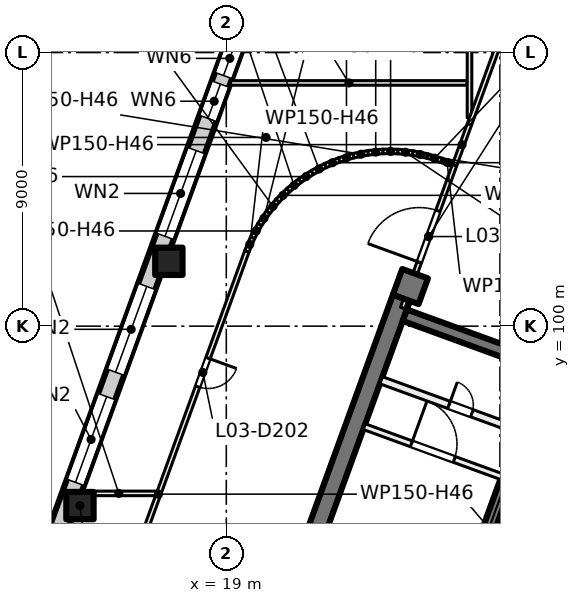
"""IFC4 building model, lengths in metres.
Left out: names, types, materials, properties, quantities, classifications, styles, units other than length and angle.
Written with IfcOpenShell. Run it as: python <this file> out.ifc"""

import sys

from ifc_helpers import new_model, si_unit, direction, frame, frame_2d, origin, origin_2d, place, context, subcontext, project, spatial, rectangle, extrude, element, fill, save


model = new_model("IFC4")
c1 = context("Model", 3, precision=1e-05, world=origin(), true_north=direction((0.0, 1.0)))
c2 = subcontext(c1, "Body", "Model", "MODEL_VIEW")
j1 = project(units=[si_unit("LENGTHUNIT", "METRE"), si_unit("PLANEANGLEUNIT", "RADIAN")], contexts=[c1])
p1 = place(None, origin())
s1 = spatial("IfcSite", under=j1, at=p1, CompositionType="ELEMENT")
p2 = place(p1, origin())
s2 = spatial("IfcBuilding", under=s1, at=p2, CompositionType="ELEMENT")
p3 = place(p2, frame((0.0, 0.0, 17.5)))
s3 = spatial("IfcBuildingStorey", under=s2, at=p3, CompositionType="ELEMENT", Elevation=17.5)
for number, where, z_axis, x_axis in (
    (1, (14.187, 94.099, 0.0), (0.0, 0.0, 1.0), (1.0, 0.0, 0.0)),
    (2, (17.111, 102.133, 0.0), (0.0, 0.0, 1.0), (1.0, 0.0, 0.0)),
    (3, (25.056, 101.303, 0.0), (0.0, 0.0, 1.0), (-0.342, -0.94, 0.0)),
):
    element("IfcColumn", number, at=place(p3, frame(where, z_axis=z_axis, x_axis=x_axis)), inside=s3, PredefinedType="COLUMN", context=c2, shape_type="SweptSolid", body=[
        extrude(rectangle(XDim=0.9, YDim=0.9, at=origin_2d()), origin(), (0.0, 0.0, 1.0), 5.0),
    ])
p4 = place(p3, frame((21.717, 92.568, 0.0), z_axis=(0.0, 0.0, 1.0), x_axis=(0.342016162452, 0.939694069696, 0.0)))
e4 = element("IfcWall", 4, at=p4, inside=s3, PredefinedType="SHEAR", context=c2, shape_type="SweptSolid", body=[
    extrude(rectangle(XDim=8.9, YDim=0.6, at=frame_2d((4.45, 0.0))), origin(), (0.0, 0.0, 1.0), 5.0),
])
p5 = place(p3, frame((27.225, 82.263, 0.0), z_axis=(0.0, 0.0, 1.0), x_axis=(0.342014590177, 0.939694641948, 0.0)))
e5 = element("IfcWall", 5, at=p5, inside=s3, PredefinedType="SHEAR", context=c2, shape_type="SweptSolid", body=[
    extrude(rectangle(XDim=12.2, YDim=0.4, at=frame_2d((6.1, 0.0))), origin(), (0.0, 0.0, 1.0), 5.0),
])
p6 = place(p5, frame((10.25, 0.0, 0.0)))
e6 = element("IfcOpeningElement", 6, at=p6, cuts=e5, PredefinedType="OPENING", context=c2, shape_type="SweptSolid", body=[
    extrude(rectangle(XDim=1.1, YDim=2.1, at=frame_2d((0.55, 1.05))), frame((0.0, 0.21, 0.0), z_axis=(0.0, -1.0, 0.0), x_axis=(1.0, 0.0, 0.0)), (0.0, 0.0, 1.0), 0.42),
])
p7 = place(p5, frame((0.7, 0.0, 0.0)))
e7 = element("IfcOpeningElement", 7, at=p7, cuts=e5, PredefinedType="OPENING", context=c2, shape_type="SweptSolid", body=[
    extrude(rectangle(XDim=0.8, YDim=2.1, at=frame_2d((0.4, 1.05))), frame((0.0, 0.21, 0.0), z_axis=(0.0, -1.0, 0.0), x_axis=(1.0, 0.0, 0.0)), (0.0, 0.0, 1.0), 0.42),
])
p8 = place(p3, frame((24.03, 83.426, 0.0), z_axis=(0.0, 0.0, 1.0), x_axis=(0.342014590177, 0.939694641948, 0.0)))
e8 = element("IfcWall", 8, at=p8, inside=s3, PredefinedType="SHEAR", context=c2, shape_type="SweptSolid", body=[
    extrude(rectangle(XDim=12.2, YDim=0.4, at=frame_2d((6.1, 0.0))), origin(), (0.0, 0.0, 1.0), 5.0),
])
p9 = place(p8, frame((7.9, 0.0, 0.0)))
e9 = element("IfcOpeningElement", 9, at=p9, cuts=e8, PredefinedType="OPENING", context=c2, shape_type="SweptSolid", body=[
    extrude(rectangle(XDim=1.1, YDim=2.1, at=frame_2d((0.55, 1.05))), frame((0.0, 0.21, 0.0), z_axis=(0.0, -1.0, 0.0), x_axis=(1.0, 0.0, 0.0)), (0.0, 0.0, 1.0), 0.42),
])
p10 = place(p3, frame((32.953, 97.418, 0.0), z_axis=(0.0, 0.0, 1.0), x_axis=(-0.93969060187, 0.342025690201, 0.0)))
e10 = element("IfcWall", 10, at=p10, inside=s3, PredefinedType="SHEAR", context=c2, shape_type="SweptSolid", body=[
    extrude(rectangle(XDim=8.6, YDim=0.4, at=frame_2d((4.3, 0.0))), origin(), (0.0, 0.0, 1.0), 5.0),
])
p11 = place(p3, frame((12.199, 89.809, 0.0), z_axis=(0.0, 0.0, 1.0), x_axis=(0.342022998908, 0.939691581434, 0.0)))
e11 = element("IfcWall", 11, at=p11, inside=s3, PredefinedType="SOLIDWALL", context=c2, shape_type="SweptSolid", body=[
    extrude(rectangle(XDim=47.334, YDim=0.6, at=frame_2d((23.667, 0.0))), origin(), (0.0, 0.0, 1.0), 4.6),
])
p12 = place(p11, frame((0.773, 0.0, 0.9)))
e12 = element("IfcOpeningElement", 12, at=p12, cuts=e11, PredefinedType="OPENING", context=c2, shape_type="SweptSolid", body=[
    extrude(rectangle(XDim=3.0, YDim=3.0, at=frame_2d((1.5, 1.5))), frame((0.0, 0.31, 0.0), z_axis=(0.0, -1.0, 0.0), x_axis=(1.0, 0.0, 0.0)), (0.0, 0.0, 1.0), 0.62),
])
p13 = place(p11, frame((5.379, 0.0, 0.9)))
e13 = element("IfcOpeningElement", 13, at=p13, cuts=e11, PredefinedType="OPENING", context=c2, shape_type="SweptSolid", body=[
    extrude(rectangle(XDim=3.0, YDim=3.0, at=frame_2d((1.5, 1.5))), frame((0.0, 0.31, 0.0), z_axis=(0.0, -1.0, 0.0), x_axis=(1.0, 0.0, 0.0)), (0.0, 0.0, 1.0), 0.62),
])
p14 = place(p11, frame((9.235, 0.0, 0.9)))
e14 = element("IfcOpeningElement", 14, at=p14, cuts=e11, PredefinedType="OPENING", context=c2, shape_type="SweptSolid", body=[
    extrude(rectangle(XDim=3.0, YDim=3.0, at=frame_2d((1.5, 1.5))), frame((0.0, 0.31, 0.0), z_axis=(0.0, -1.0, 0.0), x_axis=(1.0, 0.0, 0.0)), (0.0, 0.0, 1.0), 0.62),
])
p15 = place(p11, frame((13.99, 0.0, 0.9)))
e15 = element("IfcOpeningElement", 15, at=p15, cuts=e11, PredefinedType="OPENING", context=c2, shape_type="SweptSolid", body=[
    extrude(rectangle(XDim=3.0, YDim=3.0, at=frame_2d((1.5, 1.5))), frame((0.0, 0.31, 0.0), z_axis=(0.0, -1.0, 0.0), x_axis=(1.0, 0.0, 0.0)), (0.0, 0.0, 1.0), 0.62),
])
p16 = place(p11, frame((18.118, 0.0, 0.9)))
e16 = element("IfcOpeningElement", 16, at=p16, cuts=e11, PredefinedType="OPENING", context=c2, shape_type="SweptSolid", body=[
    extrude(rectangle(XDim=1.2, YDim=3.0, at=frame_2d((0.6, 1.5))), frame((0.0, 0.31, 0.0), z_axis=(0.0, -1.0, 0.0), x_axis=(1.0, 0.0, 0.0)), (0.0, 0.0, 1.0), 0.62),
])
p17 = place(p11, frame((19.618, 0.0, 0.9)))
e17 = element("IfcOpeningElement", 17, at=p17, cuts=e11, PredefinedType="OPENING", context=c2, shape_type="SweptSolid", body=[
    extrude(rectangle(XDim=1.2, YDim=3.0, at=frame_2d((0.6, 1.5))), frame((0.0, 0.31, 0.0), z_axis=(0.0, -1.0, 0.0), x_axis=(1.0, 0.0, 0.0)), (0.0, 0.0, 1.0), 0.62),
])
p18 = place(p11, frame((22.452, 0.0, 0.9)))
e18 = element("IfcOpeningElement", 18, at=p18, cuts=e11, PredefinedType="OPENING", context=c2, shape_type="SweptSolid", body=[
    extrude(rectangle(XDim=3.0, YDim=3.0, at=frame_2d((1.5, 1.5))), frame((0.0, 0.31, 0.0), z_axis=(0.0, -1.0, 0.0), x_axis=(1.0, 0.0, 0.0)), (0.0, 0.0, 1.0), 0.62),
])
p19 = place(p11, frame((26.458, 0.0, 0.9)))
e19 = element("IfcOpeningElement", 19, at=p19, cuts=e11, PredefinedType="OPENING", context=c2, shape_type="SweptSolid", body=[
    extrude(rectangle(XDim=3.0, YDim=3.0, at=frame_2d((1.5, 1.5))), frame((0.0, 0.31, 0.0), z_axis=(0.0, -1.0, 0.0), x_axis=(1.0, 0.0, 0.0)), (0.0, 0.0, 1.0), 0.62),
])
p20 = place(p11, frame((32.484, 0.0, 0.9)))
e20 = element("IfcOpeningElement", 20, at=p20, cuts=e11, PredefinedType="OPENING", context=c2, shape_type="SweptSolid", body=[
    extrude(rectangle(XDim=1.2, YDim=3.0, at=frame_2d((0.6, 1.5))), frame((0.0, 0.31, 0.0), z_axis=(0.0, -1.0, 0.0), x_axis=(1.0, 0.0, 0.0)), (0.0, 0.0, 1.0), 0.62),
])
p21 = place(p11, frame((35.07, 0.0, 0.9)))
e21 = element("IfcOpeningElement", 21, at=p21, cuts=e11, PredefinedType="OPENING", context=c2, shape_type="SweptSolid", body=[
    extrude(rectangle(XDim=3.0, YDim=3.0, at=frame_2d((1.5, 1.5))), frame((0.0, 0.31, 0.0), z_axis=(0.0, -1.0, 0.0), x_axis=(1.0, 0.0, 0.0)), (0.0, 0.0, 1.0), 0.62),
])
p22 = place(p11, frame((39.676, 0.0, 0.9)))
e22 = element("IfcOpeningElement", 22, at=p22, cuts=e11, PredefinedType="OPENING", context=c2, shape_type="SweptSolid", body=[
    extrude(rectangle(XDim=3.0, YDim=3.0, at=frame_2d((1.5, 1.5))), frame((0.0, 0.31, 0.0), z_axis=(0.0, -1.0, 0.0), x_axis=(1.0, 0.0, 0.0)), (0.0, 0.0, 1.0), 0.62),
])
p23 = place(p11, frame((43.531, 0.0, 0.9)))
e23 = element("IfcOpeningElement", 23, at=p23, cuts=e11, PredefinedType="OPENING", context=c2, shape_type="SweptSolid", body=[
    extrude(rectangle(XDim=3.0, YDim=3.0, at=frame_2d((1.5, 1.5))), frame((0.0, 0.31, 0.0), z_axis=(0.0, -1.0, 0.0), x_axis=(1.0, 0.0, 0.0)), (0.0, 0.0, 1.0), 0.62),
])
p24 = place(p3, frame((23.538, 96.694, 0.0), z_axis=(0.0, 0.0, 1.0), x_axis=(0.939691552312, -0.342023078919, 0.0)))
e24 = element("IfcWall", 24, at=p24, inside=s3, PredefinedType="PARTITIONING", context=c2, shape_type="SweptSolid", body=[
    extrude(rectangle(XDim=8.4, YDim=0.2, at=frame_2d((4.2, 0.0))), origin(), (0.0, 0.0, 1.0), 4.6),
])
p25 = place(p24, frame((1.65, 0.0, 0.0)))
e25 = element("IfcOpeningElement", 25, at=p25, cuts=e24, PredefinedType="OPENING", context=c2, shape_type="SweptSolid", body=[
    extrude(rectangle(XDim=1.5, YDim=2.1, at=frame_2d((0.75, 1.05))), frame((0.0, 0.11, 0.0), z_axis=(0.0, -1.0, 0.0), x_axis=(1.0, 0.0, 0.0)), (0.0, 0.0, 1.0), 0.22),
])
p26 = place(p3, frame((24.094, 98.221, 0.0), z_axis=(0.0, 0.0, 1.0), x_axis=(0.939691552312, -0.342023078919, 0.0)))
e26 = element("IfcWall", 26, at=p26, inside=s3, PredefinedType="PARTITIONING", context=c2, shape_type="SweptSolid", body=[
    extrude(rectangle(XDim=8.4, YDim=0.25, at=frame_2d((4.2, 0.0))), origin(), (0.0, 0.0, 1.0), 4.6),
])
p27 = place(p26, frame((6.625, 0.0, 0.0)))
e27 = element("IfcOpeningElement", 27, at=p27, cuts=e26, PredefinedType="OPENING", context=c2, shape_type="SweptSolid", body=[
    extrude(rectangle(XDim=0.8, YDim=2.1, at=frame_2d((0.4, 1.05))), frame((0.0, 0.135, 0.0), z_axis=(0.0, -1.0, 0.0), x_axis=(1.0, 0.0, 0.0)), (0.0, 0.0, 1.0), 0.27),
])
p28 = place(p26, frame((2.375, 0.0, 0.0)))
e28 = element("IfcOpeningElement", 28, at=p28, cuts=e26, PredefinedType="OPENING", context=c2, shape_type="SweptSolid", body=[
    extrude(rectangle(XDim=0.8, YDim=2.1, at=frame_2d((0.4, 1.05))), frame((0.0, 0.135, 0.0), z_axis=(0.0, -1.0, 0.0), x_axis=(1.0, 0.0, 0.0)), (0.0, 0.0, 1.0), 0.27),
])
p29 = place(p3, frame((13.863, 86.486, 0.0), z_axis=(0.0, 0.0, 1.0), x_axis=(0.342040480313, 0.939685218478, 0.0)))
e29 = element("IfcWall", 29, at=p29, inside=s3, PredefinedType="PARTITIONING", context=c2, shape_type="SweptSolid", body=[
    extrude(rectangle(XDim=17.004, YDim=0.15, at=frame_2d((8.502, 0.0))), origin(), (0.0, 0.0, 1.0), 4.6),
])
p30 = place(p29, frame((3.767, 0.0, 0.0)))
e30 = element("IfcOpeningElement", 30, at=p30, cuts=e29, PredefinedType="OPENING", context=c2, shape_type="SweptSolid", body=[
    extrude(rectangle(XDim=1.0, YDim=2.1, at=frame_2d((0.5, 1.05))), frame((0.0, 0.085, 0.0), z_axis=(0.0, -1.0, 0.0), x_axis=(1.0, 0.0, 0.0)), (0.0, 0.0, 1.0), 0.17),
])
p31 = place(p29, frame((12.263, 0.0, 0.0)))
e31 = element("IfcOpeningElement", 31, at=p31, cuts=e29, PredefinedType="OPENING", context=c2, shape_type="SweptSolid", body=[
    extrude(rectangle(XDim=1.0, YDim=2.1, at=frame_2d((0.5, 1.05))), frame((0.0, 0.085, 0.0), z_axis=(0.0, -1.0, 0.0), x_axis=(1.0, 0.0, 0.0)), (0.0, 0.0, 1.0), 0.17),
])
p32 = place(p3, frame((14.226, 94.5, 0.0), z_axis=(0.0, 0.0, 1.0), x_axis=(1.0, 0.0, 0.0)))
e32 = element("IfcWall", 32, at=p32, inside=s3, PredefinedType="PARTITIONING", context=c2, shape_type="SweptSolid", body=[
    extrude(rectangle(XDim=2.474, YDim=0.15, at=frame_2d((1.237, 0.0))), origin(), (0.0, 0.0, 1.0), 4.6),
])
p33 = place(p3, frame((19.14, 108.0, 0.0), z_axis=(0.0, 0.0, 1.0), x_axis=(1.0, 0.0, 0.0)))
e33 = element("IfcWall", 33, at=p33, inside=s3, PredefinedType="PARTITIONING", context=c2, shape_type="SweptSolid", body=[
    extrude(rectangle(XDim=7.785, YDim=0.15, at=frame_2d((3.893, 0.0))), origin(), (0.0, 0.0, 1.0), 4.6),
])
p34 = place(p3, frame((19.677, 102.46, 0.0), z_axis=(0.0, 0.0, 1.0), x_axis=(0.386429931229, 0.922318767157, 0.0)))
e34 = element("IfcWall", 34, at=p34, inside=s3, PredefinedType="PARTITIONING", context=c2, shape_type="SweptSolid", body=[
    extrude(rectangle(XDim=0.497, YDim=0.15, at=frame_2d((0.248, 0.0))), origin(), (0.0, 0.0, 1.0), 4.6),
])
p35 = place(p3, frame((19.866, 102.912, 0.0), z_axis=(0.0, 0.0, 1.0), x_axis=(0.478336447807, 0.878176658025, 0.0)))
e35 = element("IfcWall", 35, at=p35, inside=s3, PredefinedType="PARTITIONING", context=c2, shape_type="SweptSolid", body=[
    extrude(rectangle(XDim=0.498, YDim=0.15, at=frame_2d((0.249, 0.0))), origin(), (0.0, 0.0, 1.0), 4.6),
])
p36 = place(p3, frame((20.1, 103.343, 0.0), z_axis=(0.0, 0.0, 1.0), x_axis=(0.559439200494, 0.828871389874, 0.0)))
e36 = element("IfcWall", 36, at=p36, inside=s3, PredefinedType="PARTITIONING", context=c2, shape_type="SweptSolid", body=[
    extrude(rectangle(XDim=0.498, YDim=0.15, at=frame_2d((0.249, 0.0))), origin(), (0.0, 0.0, 1.0), 4.6),
])
p37 = place(p3, frame((20.375, 103.75, 0.0), z_axis=(0.0, 0.0, 1.0), x_axis=(0.637426997618, 0.77051075444, 0.0)))
e37 = element("IfcWall", 37, at=p37, inside=s3, PredefinedType="PARTITIONING", context=c2, shape_type="SweptSolid", body=[
    extrude(rectangle(XDim=0.497, YDim=0.15, at=frame_2d((0.249, 0.0))), origin(), (0.0, 0.0, 1.0), 4.6),
])
p38 = place(p3, frame((20.687, 104.127, 0.0), z_axis=(0.0, 0.0, 1.0), x_axis=(0.711007970504, 0.703183948821, 0.0)))
e38 = element("IfcWall", 38, at=p38, inside=s3, PredefinedType="PARTITIONING", context=c2, shape_type="SweptSolid", body=[
    extrude(rectangle(XDim=0.499, YDim=0.15, at=frame_2d((0.25, 0.0))), origin(), (0.0, 0.0, 1.0), 4.6),
])
p39 = place(p3, frame((21.036, 104.473, 0.0), z_axis=(0.0, 0.0, 1.0), x_axis=(0.77650322697, 0.630113274345, 0.0)))
e39 = element("IfcWall", 39, at=p39, inside=s3, PredefinedType="PARTITIONING", context=c2, shape_type="SweptSolid", body=[
    extrude(rectangle(XDim=0.499, YDim=0.15, at=frame_2d((0.249, 0.0))), origin(), (0.0, 0.0, 1.0), 4.6),
])
for number, where, z_axis, x_axis in (
    (40, (21.417, 104.783, 0.0), (0.0, 0.0, 1.0), (0.835, 0.55, 0.0)),
    (41, (21.827, 105.053, 0.0), (0.0, 0.0, 1.0), (0.884, 0.468, 0.0)),
):
    element("IfcWall", number, at=place(p3, frame(where, z_axis=z_axis, x_axis=x_axis)), inside=s3, PredefinedType="PARTITIONING", context=c2, shape_type="SweptSolid", body=[
        extrude(rectangle(XDim=0.498, YDim=0.15, at=frame_2d((0.249, 0.0))), origin(), (0.0, 0.0, 1.0), 4.6),
    ])
p40 = place(p3, frame((22.261, 105.283, 0.0), z_axis=(0.0, 0.0, 1.0), x_axis=(0.926359379867, 0.376640809436, 0.0)))
e42 = element("IfcWall", 42, at=p40, inside=s3, PredefinedType="PARTITIONING", context=c2, shape_type="SweptSolid", body=[
    extrude(rectangle(XDim=0.497, YDim=0.15, at=frame_2d((0.248, 0.0))), origin(), (0.0, 0.0, 1.0), 4.6),
])
p41 = place(p3, frame((22.714, 105.468, 0.0), z_axis=(0.0, 0.0, 1.0), x_axis=(0.958511041414, 0.285055404243, 0.0)))
e43 = element("IfcWall", 43, at=p41, inside=s3, PredefinedType="PARTITIONING", context=c2, shape_type="SweptSolid", body=[
    extrude(rectangle(XDim=0.499, YDim=0.15, at=frame_2d((0.249, 0.0))), origin(), (0.0, 0.0, 1.0), 4.6),
])
p42 = place(p3, frame((23.184, 105.608, 0.0), z_axis=(0.0, 0.0, 1.0), x_axis=(0.981729772821, 0.190280459207, 0.0)))
e44 = element("IfcWall", 44, at=p42, inside=s3, PredefinedType="PARTITIONING", context=c2, shape_type="SweptSolid", body=[
    extrude(rectangle(XDim=0.499, YDim=0.15, at=frame_2d((0.25, 0.0))), origin(), (0.0, 0.0, 1.0), 4.6),
])
p43 = place(p3, frame((23.666, 105.702, 0.0), z_axis=(0.0, 0.0, 1.0), x_axis=(0.995719029091, 0.092431678044, 0.0)))
e45 = element("IfcWall", 45, at=p43, inside=s3, PredefinedType="PARTITIONING", context=c2, shape_type="SweptSolid", body=[
    extrude(rectangle(XDim=0.499, YDim=0.15, at=frame_2d((0.25, 0.0))), origin(), (0.0, 0.0, 1.0), 4.6),
])
p44 = place(p3, frame((24.155, 105.748, 0.0), z_axis=(0.0, 0.0, 1.0), x_axis=(0.999982699411, -0.005882251173, 0.0)))
e46 = element("IfcWall", 46, at=p44, inside=s3, PredefinedType="PARTITIONING", context=c2, shape_type="SweptSolid", body=[
    extrude(rectangle(XDim=0.498, YDim=0.15, at=frame_2d((0.249, 0.0))), origin(), (0.0, 0.0, 1.0), 4.6),
])
p45 = place(p3, frame((24.645, 105.745, 0.0), z_axis=(0.0, 0.0, 1.0), x_axis=(0.994752095055, -0.102314560958, 0.0)))
e47 = element("IfcWall", 47, at=p45, inside=s3, PredefinedType="PARTITIONING", context=c2, shape_type="SweptSolid", body=[
    extrude(rectangle(XDim=0.499, YDim=0.15, at=frame_2d((0.25, 0.0))), origin(), (0.0, 0.0, 1.0), 4.6),
])
p46 = place(p3, frame((24.8, 100.598, 0.0), z_axis=(0.0, 0.0, 1.0), x_axis=(0.34194689438, 0.939719277989, 0.0)))
e48 = element("IfcWall", 48, at=p46, inside=s3, PredefinedType="PARTITIONING", context=c2, shape_type="SweptSolid", body=[
    extrude(rectangle(XDim=5.001, YDim=0.15, at=frame_2d((2.5, 0.0))), origin(), (0.0, 0.0, 1.0), 4.6),
])
p47 = place(p46, frame((1.6, 0.0, 0.0)))
e49 = element("IfcOpeningElement", 49, at=p47, cuts=e48, PredefinedType="OPENING", context=c2, shape_type="SweptSolid", body=[
    extrude(rectangle(XDim=1.8, YDim=2.1, at=frame_2d((0.9, 1.05))), frame((0.0, 0.085, 0.0), z_axis=(0.0, -1.0, 0.0), x_axis=(1.0, 0.0, 0.0)), (0.0, 0.0, 1.0), 0.17),
])
p48 = place(p3, frame((25.133, 105.695, 0.0), z_axis=(0.0, 0.0, 1.0), x_axis=(0.979686550711, -0.200534940485, 0.0)))
e50 = element("IfcWall", 50, at=p48, inside=s3, PredefinedType="PARTITIONING", context=c2, shape_type="SweptSolid", body=[
    extrude(rectangle(XDim=0.499, YDim=0.15, at=frame_2d((0.25, 0.0))), origin(), (0.0, 0.0, 1.0), 4.6),
])
p49 = place(p3, frame((25.614, 105.597, 0.0), z_axis=(0.0, 0.0, 1.0), x_axis=(0.955332101268, -0.29553439104, 0.0)))
e51 = element("IfcWall", 51, at=p49, inside=s3, PredefinedType="PARTITIONING", context=c2, shape_type="SweptSolid", body=[
    extrude(rectangle(XDim=0.497, YDim=0.15, at=frame_2d((0.249, 0.0))), origin(), (0.0, 0.0, 1.0), 4.6),
])
p50 = place(p3, frame((26.085, 105.452, 0.0), z_axis=(0.0, 0.0, 1.0), x_axis=(0.939944328342, -0.341327789109, 0.0)))
e52 = element("IfcWall", 52, at=p50, inside=s3, PredefinedType="PARTITIONING", context=c2, shape_type="SweptSolid", body=[
    extrude(rectangle(XDim=0.378, YDim=0.15, at=frame_2d((0.189, 0.0))), origin(), (0.0, 0.0, 1.0), 4.6),
])
p51 = place(p3, frame((26.51, 105.297, 0.0), z_axis=(0.0, 0.0, 1.0), x_axis=(0.341866150321, 0.939748655367, 0.0)))
e53 = element("IfcWall", 53, at=p51, inside=s3, PredefinedType="PARTITIONING", context=c2, shape_type="SweptSolid", body=[
    extrude(rectangle(XDim=1.433, YDim=0.15, at=frame_2d((0.717, 0.0))), origin(), (0.0, 0.0, 1.0), 4.6),
])
p52 = place(p3, frame((27.0, 106.858, 0.0), z_axis=(0.0, 0.0, 1.0), x_axis=(0.0, 1.0, 0.0)))
e54 = element("IfcWall", 54, at=p52, inside=s3, PredefinedType="PARTITIONING", context=c2, shape_type="SweptSolid", body=[
    extrude(rectangle(XDim=12.103, YDim=0.15, at=frame_2d((6.052, 0.0))), origin(), (0.0, 0.0, 1.0), 4.6),
])
p53 = place(p3, frame((27.0, 106.644, 0.0), z_axis=(0.0, 0.0, 1.0), x_axis=(0.3420012765, 0.939699487534, 0.0)))
e55 = element("IfcWall", 55, at=p53, inside=s3, PredefinedType="PARTITIONING", context=c2, shape_type="SweptSolid", body=[
    extrude(rectangle(XDim=13.816, YDim=0.15, at=frame_2d((6.908, 0.0))), origin(), (0.0, 0.0, 1.0), 4.6),
])
p54 = place(p13, origin())
e56 = element("IfcWindow", 56, at=p54, inside=s3, PartitioningType="SINGLE_PANEL", PredefinedType="WINDOW", context=c2, shape_type="SweptSolid", body=[
    extrude(rectangle(XDim=3.0, YDim=3.0, at=frame_2d((1.5, 1.5))), frame((0.0, 0.03, 0.0), z_axis=(0.0, -1.0, 0.0), x_axis=(1.0, 0.0, 0.0)), (0.0, 0.0, 1.0), 0.06),
])
fill(e13, e56)
p55 = place(p14, origin())
e57 = element("IfcWindow", 57, at=p55, inside=s3, PartitioningType="SINGLE_PANEL", PredefinedType="WINDOW", context=c2, shape_type="SweptSolid", body=[
    extrude(rectangle(XDim=3.0, YDim=3.0, at=frame_2d((1.5, 1.5))), frame((0.0, 0.03, 0.0), z_axis=(0.0, -1.0, 0.0), x_axis=(1.0, 0.0, 0.0)), (0.0, 0.0, 1.0), 0.06),
])
fill(e14, e57)
p56 = place(p15, origin())
e58 = element("IfcWindow", 58, at=p56, inside=s3, PartitioningType="SINGLE_PANEL", PredefinedType="WINDOW", context=c2, shape_type="SweptSolid", body=[
    extrude(rectangle(XDim=3.0, YDim=3.0, at=frame_2d((1.5, 1.5))), frame((0.0, 0.03, 0.0), z_axis=(0.0, -1.0, 0.0), x_axis=(1.0, 0.0, 0.0)), (0.0, 0.0, 1.0), 0.06),
])
fill(e15, e58)
p57 = place(p16, origin())
e59 = element("IfcWindow", 59, at=p57, inside=s3, PartitioningType="SINGLE_PANEL", PredefinedType="WINDOW", context=c2, shape_type="SweptSolid", body=[
    extrude(rectangle(XDim=1.2, YDim=3.0, at=frame_2d((0.6, 1.5))), frame((0.0, 0.03, 0.0), z_axis=(0.0, -1.0, 0.0), x_axis=(1.0, 0.0, 0.0)), (0.0, 0.0, 1.0), 0.06),
])
fill(e16, e59)
p58 = place(p17, origin())
e60 = element("IfcWindow", 60, at=p58, inside=s3, PartitioningType="SINGLE_PANEL", PredefinedType="WINDOW", context=c2, shape_type="SweptSolid", body=[
    extrude(rectangle(XDim=1.2, YDim=3.0, at=frame_2d((0.6, 1.5))), frame((0.0, 0.03, 0.0), z_axis=(0.0, -1.0, 0.0), x_axis=(1.0, 0.0, 0.0)), (0.0, 0.0, 1.0), 0.06),
])
fill(e17, e60)
p59 = place(p25, origin())
e61 = element("IfcDoor", 61, at=p59, inside=s3, OperationType="DOUBLE_DOOR_SINGLE_SWING", PredefinedType="DOOR", context=c2, shape_type="SweptSolid", body=[
    extrude(rectangle(XDim=1.5, YDim=2.1, at=frame_2d((0.75, 1.05))), frame((0.0, 0.025, 0.0), z_axis=(0.0, -1.0, 0.0), x_axis=(1.0, 0.0, 0.0)), (0.0, 0.0, 1.0), 0.05),
])
fill(e25, e61)
p60 = place(p28, origin())
e62 = element("IfcDoor", 62, at=p60, inside=s3, OperationType="SINGLE_SWING_RIGHT", PredefinedType="DOOR", context=c2, shape_type="SweptSolid", body=[
    extrude(rectangle(XDim=0.8, YDim=2.1, at=frame_2d((0.4, 1.05))), frame((0.0, 0.025, 0.0), z_axis=(0.0, -1.0, 0.0), x_axis=(1.0, 0.0, 0.0)), (0.0, 0.0, 1.0), 0.05),
])
fill(e28, e62)
p61 = place(p31, origin())
e63 = element("IfcDoor", 63, at=p61, inside=s3, OperationType="SINGLE_SWING_RIGHT", PredefinedType="DOOR", context=c2, shape_type="SweptSolid", body=[
    extrude(rectangle(XDim=1.0, YDim=2.1, at=frame_2d((0.5, 1.05))), frame((0.0, 0.025, 0.0), z_axis=(0.0, -1.0, 0.0), x_axis=(1.0, 0.0, 0.0)), (0.0, 0.0, 1.0), 0.05),
])
fill(e31, e63)
p62 = place(p47, origin())
e64 = element("IfcDoor", 64, at=p62, inside=s3, OperationType="DOUBLE_DOOR_SINGLE_SWING", PredefinedType="DOOR", context=c2, shape_type="SweptSolid", body=[
    extrude(rectangle(XDim=1.8, YDim=2.1, at=frame_2d((0.9, 1.05))), frame((0.0, 0.025, 0.0), z_axis=(0.0, -1.0, 0.0), x_axis=(1.0, 0.0, 0.0)), (0.0, 0.0, 1.0), 0.05),
])
fill(e49, e64)
save(model, sys.argv[1])
